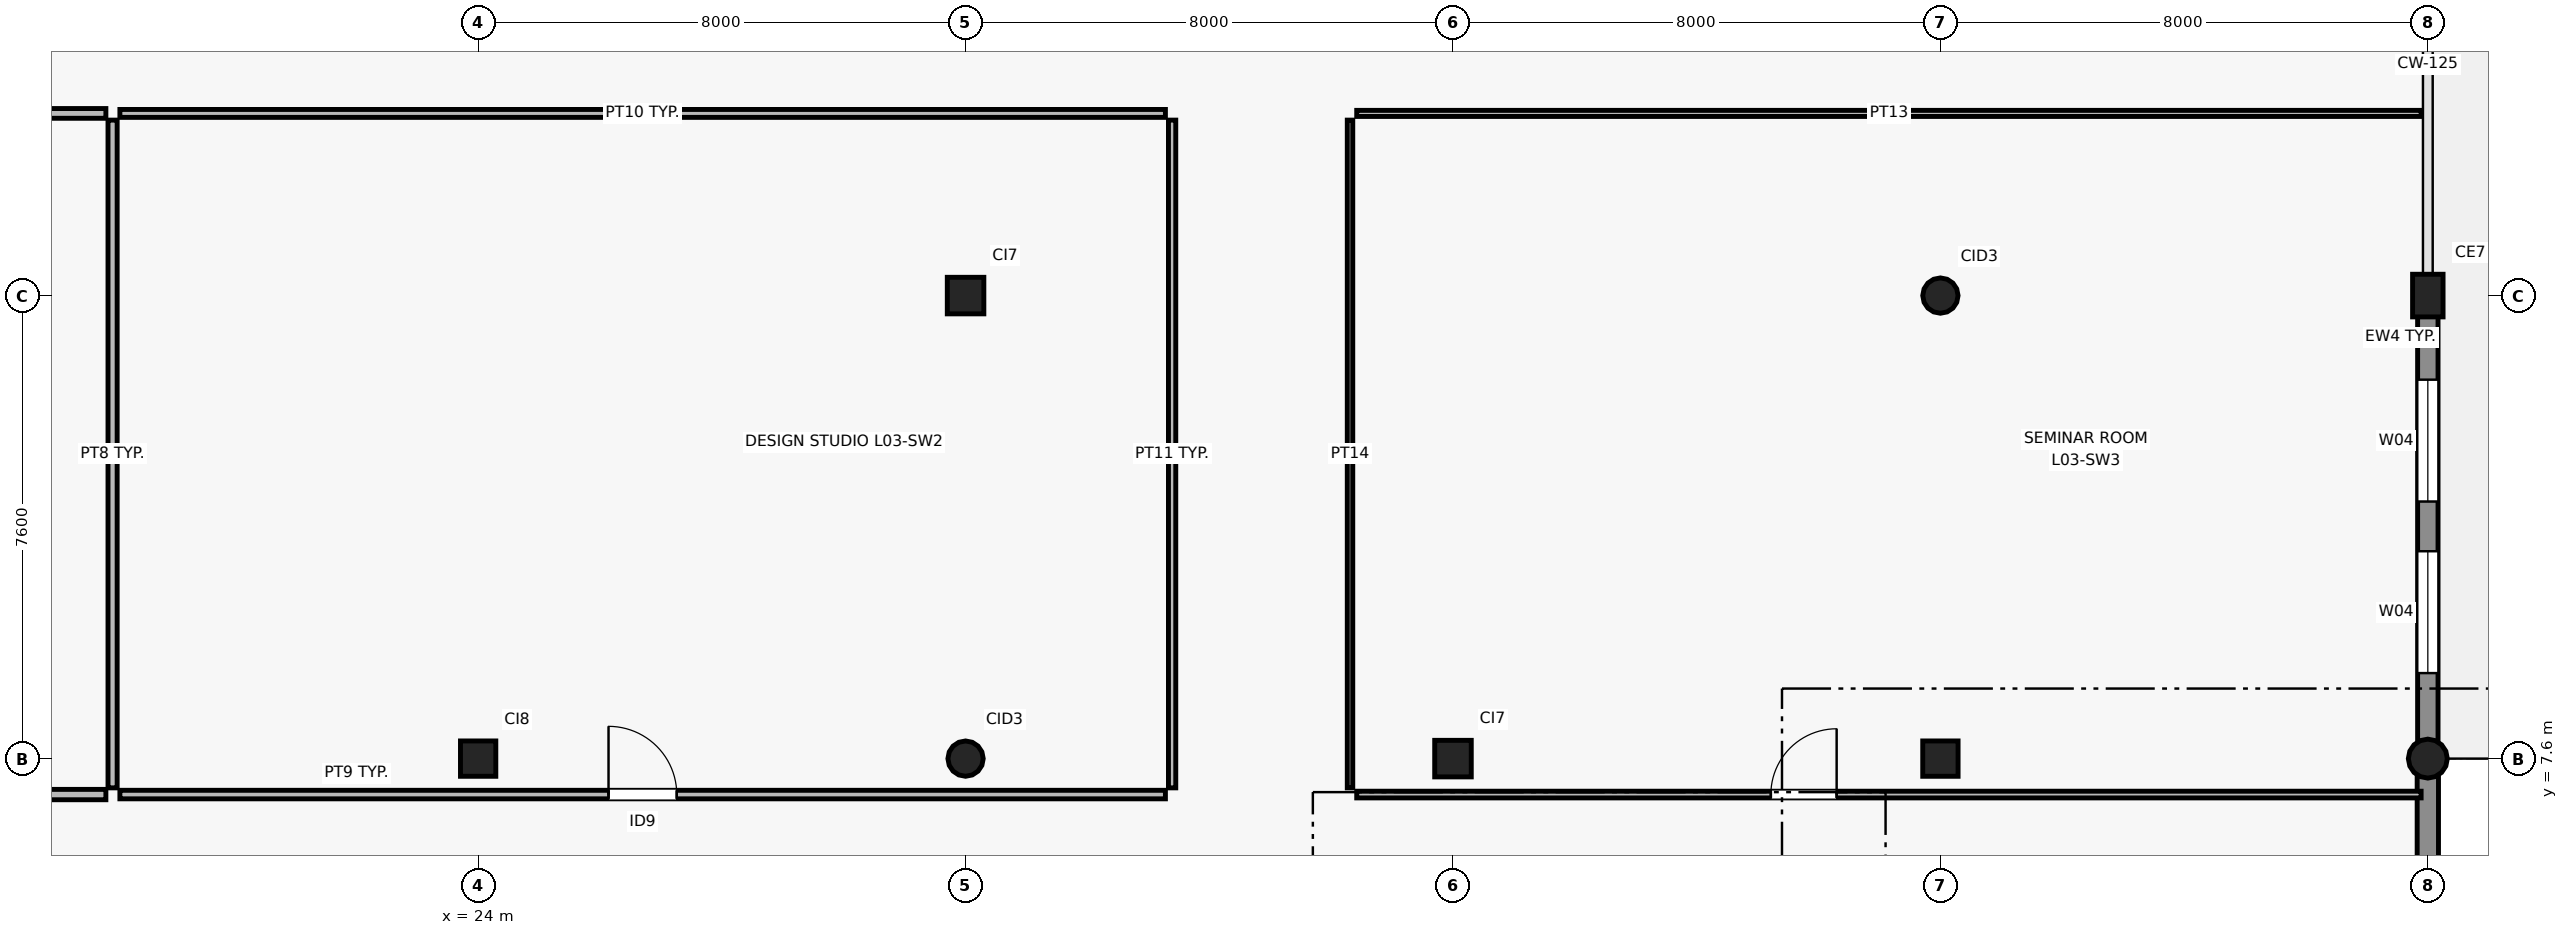
"""IFC4 building model, lengths in metres.
Left out: names, types, materials, properties, quantities, classifications, styles, units other than length and angle.
Written with IfcOpenShell. Run it as: python <this file> out.ifc"""

import sys

from ifc_helpers import new_model, si_unit, direction, frame, frame_2d, origin, origin_2d, place, context, subcontext, project, spatial, rectangle, circle, extrude, element, fill, save


model = new_model("IFC4")
c1 = context("Model", 3, precision=1e-05, world=origin(), true_north=direction((0.0, 1.0)))
c2 = subcontext(c1, "Body", "Model", "MODEL_VIEW")
j1 = project(units=[si_unit("LENGTHUNIT", "METRE"), si_unit("PLANEANGLEUNIT", "RADIAN")], contexts=[c1])
p1 = place(None, origin())
s1 = spatial("IfcSite", under=j1, at=p1, CompositionType="ELEMENT")
p2 = place(p1, origin())
s2 = spatial("IfcBuilding", under=s1, at=p2, CompositionType="ELEMENT")
p3 = place(p2, frame((0.0, 0.0, 13.2)))
s3 = spatial("IfcBuildingStorey", under=s2, at=p3, CompositionType="ELEMENT", Elevation=13.2)
p4 = place(p3, frame((24.0, 7.6, 0.0), z_axis=(0.0, 0.0, 1.0), x_axis=(1.0, 0.0, 0.0)))
e1 = element("IfcColumn", 1, at=p4, inside=s3, PredefinedType="COLUMN", context=c2, shape_type="SweptSolid", body=[
    extrude(rectangle(XDim=0.58, YDim=0.58, at=origin_2d()), origin(), (0.0, 0.0, 1.0), 4.2),
])
p5 = place(p3, frame((32.0, 7.6, 0.0), z_axis=(0.0, 0.0, 1.0), x_axis=(1.0, 0.0, 0.0)))
e2 = element("IfcColumn", 2, at=p5, inside=s3, PredefinedType="COLUMN", context=c2, shape_type="SweptSolid", body=[
    extrude(circle(Radius=0.29, at=origin_2d()), origin(), (0.0, 0.0, 1.0), 4.2),
])
for number, where, z_axis, x_axis in (
    (3, (32.0, 15.2, 0.0), (0.0, 0.0, 1.0), (1.0, 0.0, 0.0)),
    (4, (40.0, 7.6, 0.0), (0.0, 0.0, 1.0), (1.0, 0.0, 0.0)),
):
    element("IfcColumn", number, at=place(p3, frame(where, z_axis=z_axis, x_axis=x_axis)), inside=s3, PredefinedType="COLUMN", context=c2, shape_type="SweptSolid", body=[
        extrude(rectangle(XDim=0.6, YDim=0.6, at=origin_2d()), origin(), (0.0, 0.0, 1.0), 4.2),
    ])
p6 = place(p3, frame((48.0, 7.6, 0.0), z_axis=(0.0, 0.0, 1.0), x_axis=(1.0, 0.0, 0.0)))
e5 = element("IfcColumn", 5, at=p6, inside=s3, PredefinedType="COLUMN", context=c2, shape_type="SweptSolid", body=[
    extrude(rectangle(XDim=0.58, YDim=0.58, at=origin_2d()), origin(), (0.0, 0.0, 1.0), 4.2),
])
p7 = place(p3, frame((48.0, 15.2, 0.0), z_axis=(0.0, 0.0, 1.0), x_axis=(1.0, 0.0, 0.0)))
e6 = element("IfcColumn", 6, at=p7, inside=s3, PredefinedType="COLUMN", context=c2, shape_type="SweptSolid", body=[
    extrude(circle(Radius=0.29, at=origin_2d()), origin(), (0.0, 0.0, 1.0), 4.2),
])
p8 = place(p3, frame((56.0, 7.6, 0.0), z_axis=(0.0, 0.0, 1.0), x_axis=(1.0, 0.0, 0.0)))
e7 = element("IfcColumn", 7, at=p8, inside=s3, PredefinedType="COLUMN", context=c2, shape_type="SweptSolid", body=[
    extrude(circle(Radius=0.32, at=origin_2d()), origin(), (0.0, 0.0, 1.0), 4.2),
])
p9 = place(p3, frame((56.0, 15.2, 0.0), z_axis=(0.0, 0.0, 1.0), x_axis=(1.0, 0.0, 0.0)))
e8 = element("IfcColumn", 8, at=p9, inside=s3, PredefinedType="COLUMN", context=c2, shape_type="SweptSolid", body=[
    extrude(rectangle(XDim=0.7, YDim=0.5, at=origin_2d()), origin(), (0.0, 0.0, 1.0), 4.2),
])
p10 = place(p3, frame((56.0, 0.245, 0.0), z_axis=(0.0, 0.0, 1.0), x_axis=(0.0, 1.0, 0.0)))
e9 = element("IfcWall", 9, at=p10, inside=s3, PredefinedType="SOLIDWALL", context=c2, shape_type="SweptSolid", body=[
    extrude(rectangle(XDim=7.086, YDim=0.35, at=frame_2d((3.543, 0.0))), origin(), (0.0, 0.0, 1.0), 3.92),
])
p11 = place(p3, frame((56.0, 7.869, 0.0), z_axis=(0.0, 0.0, 1.0), x_axis=(0.0, 1.0, 0.0)))
e10 = element("IfcWall", 10, at=p11, inside=s3, PredefinedType="SOLIDWALL", context=c2, shape_type="SweptSolid", body=[
    extrude(rectangle(XDim=7.086, YDim=0.335, at=frame_2d((3.543, 0.0))), origin(), (0.0, 0.0, 1.0), 3.52),
])
p12 = place(p11, frame((1.135, 0.0, 0.9)))
e11 = element("IfcOpeningElement", 11, at=p12, cuts=e10, PredefinedType="OPENING", context=c2, shape_type="SweptSolid", body=[
    extrude(rectangle(XDim=2.0, YDim=1.8, at=frame_2d((1.0, 0.9))), frame((0.0, 0.177, 0.0), z_axis=(0.0, -1.0, 0.0), x_axis=(1.0, 0.0, 0.0)), (0.0, 0.0, 1.0), 0.355),
])
p13 = place(p11, frame((3.951, 0.0, 0.9)))
e12 = element("IfcOpeningElement", 12, at=p13, cuts=e10, PredefinedType="OPENING", context=c2, shape_type="SweptSolid", body=[
    extrude(rectangle(XDim=2.0, YDim=1.8, at=frame_2d((1.0, 0.9))), frame((0.0, 0.177, 0.0), z_axis=(0.0, -1.0, 0.0), x_axis=(1.0, 0.0, 0.0)), (0.0, 0.0, 1.0), 0.355),
])
p14 = place(p3, frame((0.11, 7.01, 0.0), z_axis=(0.0, 0.0, 1.0), x_axis=(1.0, 0.0, 0.0)))
e13 = element("IfcWall", 13, at=p14, inside=s3, PredefinedType="PARTITIONING", context=c2, shape_type="SweptSolid", body=[
    extrude(rectangle(XDim=17.78, YDim=0.17, at=frame_2d((8.89, 0.0))), origin(), (0.0, 0.0, 1.0), 3.9),
])
p15 = place(p14, frame((9.722, 0.0, 0.0)))
e14 = element("IfcOpeningElement", 14, at=p15, cuts=e13, PredefinedType="OPENING", context=c2, shape_type="SweptSolid", body=[
    extrude(rectangle(XDim=1.18, YDim=2.2, at=frame_2d((0.59, 1.1))), frame((0.0, 0.095, 0.0), z_axis=(0.0, -1.0, 0.0), x_axis=(1.0, 0.0, 0.0)), (0.0, 0.0, 1.0), 0.19),
])
p16 = place(p3, frame((0.11, 18.19, 0.0), z_axis=(0.0, 0.0, 1.0), x_axis=(1.0, 0.0, 0.0)))
e15 = element("IfcWall", 15, at=p16, inside=s3, PredefinedType="PARTITIONING", context=c2, shape_type="SweptSolid", body=[
    extrude(rectangle(XDim=17.78, YDim=0.16, at=frame_2d((8.89, 0.0))), origin(), (0.0, 0.0, 1.0), 3.9),
])
p17 = place(p3, frame((18.0, 7.12, 0.0), z_axis=(0.0, 0.0, 1.0), x_axis=(0.0, 1.0, 0.0)))
e16 = element("IfcWall", 16, at=p17, inside=s3, PredefinedType="PARTITIONING", context=c2, shape_type="SweptSolid", body=[
    extrude(rectangle(XDim=10.96, YDim=0.15, at=frame_2d((5.48, 0.0))), origin(), (0.0, 0.0, 1.0), 3.9),
])
p18 = place(p3, frame((18.12, 7.01, 0.0), z_axis=(0.0, 0.0, 1.0), x_axis=(1.0, 0.0, 0.0)))
e17 = element("IfcWall", 17, at=p18, inside=s3, PredefinedType="PARTITIONING", context=c2, shape_type="SweptSolid", body=[
    extrude(rectangle(XDim=17.16, YDim=0.14, at=frame_2d((8.58, 0.0))), origin(), (0.0, 0.0, 1.0), 3.9),
])
p19 = place(p18, frame((8.02, 0.0, 0.0)))
e18 = element("IfcOpeningElement", 18, at=p19, cuts=e17, PredefinedType="OPENING", context=c2, shape_type="SweptSolid", body=[
    extrude(rectangle(XDim=1.12, YDim=2.2, at=frame_2d((0.56, 1.1))), frame((0.0, 0.08, 0.0), z_axis=(0.0, -1.0, 0.0), x_axis=(1.0, 0.0, 0.0)), (0.0, 0.0, 1.0), 0.16),
])
p20 = place(p3, frame((18.12, 18.19, 0.0), z_axis=(0.0, 0.0, 1.0), x_axis=(1.0, 0.0, 0.0)))
e19 = element("IfcWall", 19, at=p20, inside=s3, PredefinedType="PARTITIONING", context=c2, shape_type="SweptSolid", body=[
    extrude(rectangle(XDim=17.16, YDim=0.13, at=frame_2d((8.58, 0.0))), origin(), (0.0, 0.0, 1.0), 3.9),
])
p21 = place(p3, frame((35.39, 7.12, 0.0), z_axis=(0.0, 0.0, 1.0), x_axis=(0.0, 1.0, 0.0)))
e20 = element("IfcWall", 20, at=p21, inside=s3, PredefinedType="PARTITIONING", context=c2, shape_type="SweptSolid", body=[
    extrude(rectangle(XDim=10.96, YDim=0.12, at=frame_2d((5.48, 0.0))), origin(), (0.0, 0.0, 1.0), 3.9),
])
p22 = place(p3, frame((38.42, 7.01, 0.0), z_axis=(0.0, 0.0, 1.0), x_axis=(1.0, 0.0, 0.0)))
e21 = element("IfcWall", 21, at=p22, inside=s3, PredefinedType="PARTITIONING", context=c2, shape_type="SweptSolid", body=[
    extrude(rectangle(XDim=17.47, YDim=0.11, at=frame_2d((8.735, 0.0))), origin(), (0.0, 0.0, 1.0), 3.9),
])
p23 = place(p22, frame((6.797, 0.0, 0.0)))
e22 = element("IfcOpeningElement", 22, at=p23, cuts=e21, PredefinedType="OPENING", context=c2, shape_type="SweptSolid", body=[
    extrude(rectangle(XDim=1.08, YDim=2.15, at=frame_2d((0.54, 1.075))), frame((0.0, 0.065, 0.0), z_axis=(0.0, -1.0, 0.0), x_axis=(1.0, 0.0, 0.0)), (0.0, 0.0, 1.0), 0.13),
])
p24 = place(p3, frame((38.42, 18.19, 0.0), z_axis=(0.0, 0.0, 1.0), x_axis=(1.0, 0.0, 0.0)))
e23 = element("IfcWall", 23, at=p24, inside=s3, PredefinedType="PARTITIONING", context=c2, shape_type="SweptSolid", body=[
    extrude(rectangle(XDim=17.47, YDim=0.1, at=frame_2d((8.735, 0.0))), origin(), (0.0, 0.0, 1.0), 3.9),
])
p25 = place(p3, frame((38.31, 7.12, 0.0), z_axis=(0.0, 0.0, 1.0), x_axis=(0.0, 1.0, 0.0)))
e24 = element("IfcWall", 24, at=p25, inside=s3, PredefinedType="PARTITIONING", context=c2, shape_type="SweptSolid", body=[
    extrude(rectangle(XDim=10.96, YDim=0.09, at=frame_2d((5.48, 0.0))), origin(), (0.0, 0.0, 1.0), 3.9),
])
p26 = place(p12, origin())
e25 = element("IfcWindow", 25, at=p26, inside=s3, PartitioningType="SINGLE_PANEL", PredefinedType="WINDOW", context=c2, shape_type="SweptSolid", body=[
    extrude(rectangle(XDim=2.0, YDim=1.8, at=frame_2d((1.0, 0.9))), frame((0.0, 0.03, 0.0), z_axis=(0.0, -1.0, 0.0), x_axis=(1.0, 0.0, 0.0)), (0.0, 0.0, 1.0), 0.06),
])
fill(e11, e25)
p27 = place(p13, origin())
e26 = element("IfcWindow", 26, at=p27, inside=s3, PartitioningType="SINGLE_PANEL", PredefinedType="WINDOW", context=c2, shape_type="SweptSolid", body=[
    extrude(rectangle(XDim=2.0, YDim=1.8, at=frame_2d((1.0, 0.9))), frame((0.0, 0.03, 0.0), z_axis=(0.0, -1.0, 0.0), x_axis=(1.0, 0.0, 0.0)), (0.0, 0.0, 1.0), 0.06),
])
fill(e12, e26)
p28 = place(p19, origin())
e27 = element("IfcDoor", 27, at=p28, inside=s3, OperationType="SINGLE_SWING_LEFT", PredefinedType="DOOR", context=c2, shape_type="SweptSolid", body=[
    extrude(rectangle(XDim=1.12, YDim=2.2, at=frame_2d((0.56, 1.1))), frame((0.0, 0.025, 0.0), z_axis=(0.0, -1.0, 0.0), x_axis=(1.0, 0.0, 0.0)), (0.0, 0.0, 1.0), 0.05),
])
fill(e18, e27)
p29 = place(p23, origin())
e28 = element("IfcDoor", 28, at=p29, inside=s3, OperationType="SINGLE_SWING_RIGHT", PredefinedType="DOOR", context=c2, shape_type="SweptSolid", body=[
    extrude(rectangle(XDim=1.08, YDim=2.15, at=frame_2d((0.54, 1.075))), frame((0.0, 0.025, 0.0), z_axis=(0.0, -1.0, 0.0), x_axis=(1.0, 0.0, 0.0)), (0.0, 0.0, 1.0), 0.05),
])
fill(e22, e28)
save(model, sys.argv[1])
